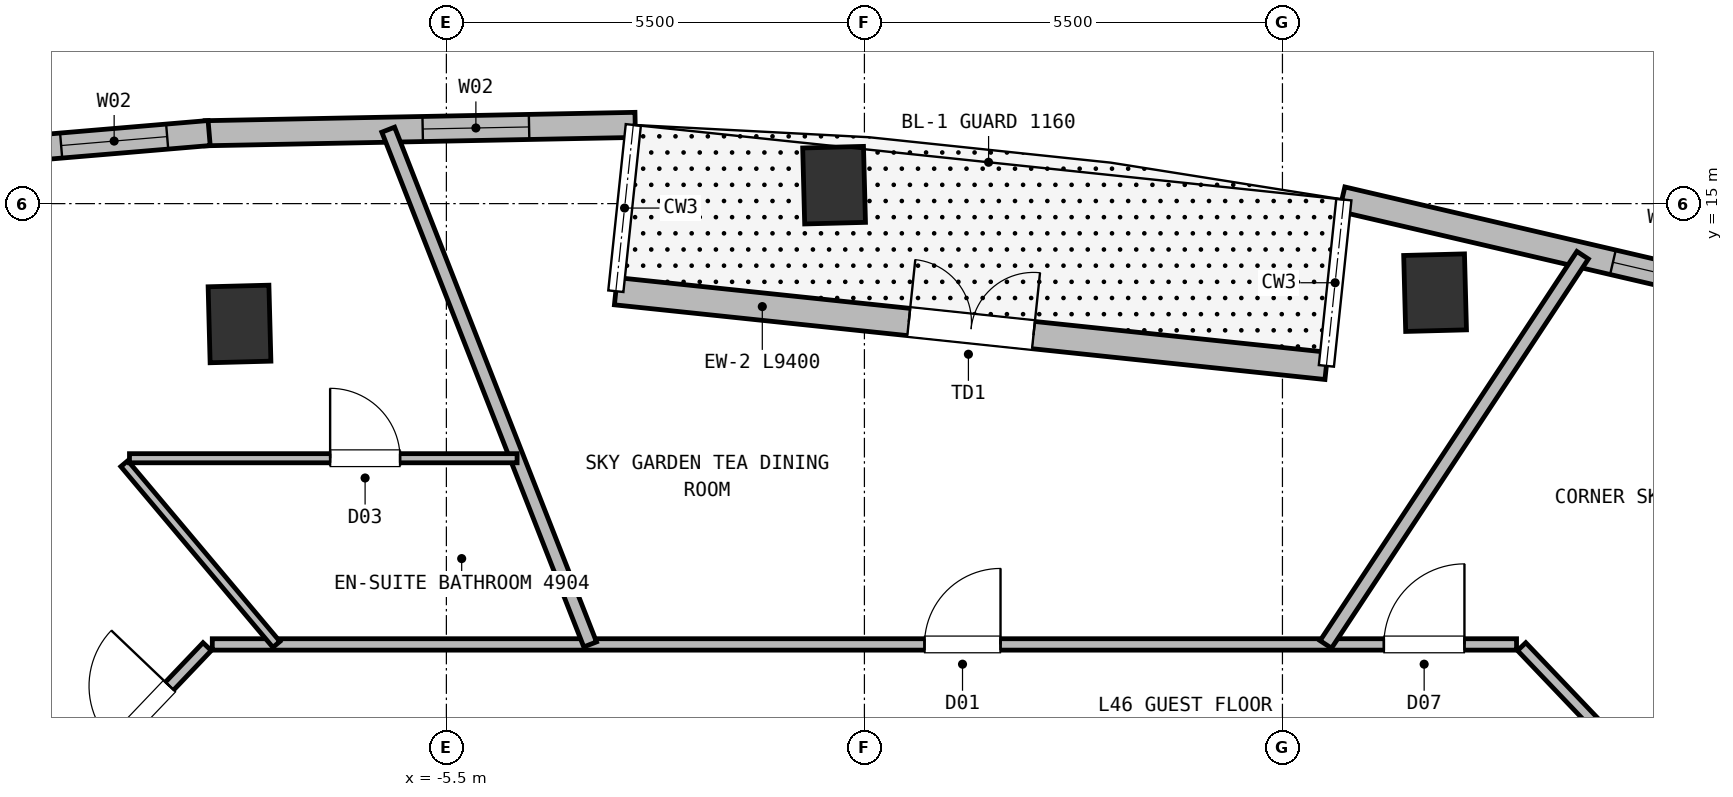
"""IFC4 building model, lengths in metres.
Left out: names, types, materials, properties, quantities, classifications, styles, units other than length and angle.
Written with IfcOpenShell. Run it as: python <this file> out.ifc"""

import sys

from ifc_helpers import new_model, si_unit, direction, frame, frame_2d, origin, origin_2d, place, context, subcontext, project, spatial, rectangle, extrude, element, fill, save


model = new_model("IFC4")
c1 = context("Model", 3, precision=1e-05, world=origin(), true_north=direction((0.0, 1.0)))
c2 = subcontext(c1, "Body", "Model", "MODEL_VIEW")
j1 = project(units=[si_unit("LENGTHUNIT", "METRE"), si_unit("PLANEANGLEUNIT", "RADIAN")], contexts=[c1])
p1 = place(None, origin())
s1 = spatial("IfcSite", under=j1, at=p1, CompositionType="ELEMENT")
p2 = place(p1, origin())
s2 = spatial("IfcBuilding", under=s1, at=p2, CompositionType="ELEMENT")
p3 = place(p2, frame((0.0, 0.0, 186.55)))
s3 = spatial("IfcBuildingStorey", under=s2, at=p3, CompositionType="ELEMENT", Elevation=186.55)
for number, where, z_axis, x_axis in (
    (1, (7.508, 13.828, 0.0), (0.0, 0.0, 1.0), (1.0, 0.026, 0.0)),
    (2, (-0.399, 15.243, 0.0), (0.0, 0.0, 1.0), (1.0, 0.026, 0.0)),
    (3, (-8.222, 13.417, 0.0), (0.0, 0.0, 1.0), (1.0, 0.026, 0.0)),
):
    element("IfcColumn", number, at=place(p3, frame(where, z_axis=z_axis, x_axis=x_axis)), inside=s3, PredefinedType="COLUMN", context=c2, shape_type="SweptSolid", body=[
        extrude(rectangle(XDim=0.8, YDim=1.0, at=origin_2d()), origin(), (0.0, 0.0, 1.0), 3.8),
    ])
p4 = place(p3, frame((-3.271, 13.848, 0.0), z_axis=(0.0, 0.0, 1.0), x_axis=(0.994520954065, -0.104537418785, 0.0)))
e4 = element("IfcWall", 4, at=p4, inside=s3, PredefinedType="SOLIDWALL", context=c2, shape_type="SweptSolid", body=[
    extrude(rectangle(XDim=9.4, YDim=0.36, at=frame_2d((4.7, 0.0))), origin(), (0.0, 0.0, 1.0), 3.55),
])
p5 = place(p4, frame((3.875, 0.0, 0.0)))
e5 = element("IfcOpeningElement", 5, at=p5, cuts=e4, PredefinedType="OPENING", context=c2, shape_type="SweptSolid", body=[
    extrude(rectangle(XDim=1.65, YDim=2.25, at=frame_2d((0.825, 1.125))), frame((0.0, 0.19, 0.0), z_axis=(0.0, -1.0, 0.0), x_axis=(1.0, 0.0, 0.0)), (0.0, 0.0, 1.0), 0.38),
])
p6 = place(p3, frame((6.284, 15.059, 0.0), z_axis=(0.0, 0.0, 1.0), x_axis=(0.973919150731, -0.226895323527, 0.0)))
e6 = element("IfcWall", 6, at=p6, inside=s3, PredefinedType="SOLIDWALL", context=c2, shape_type="SweptSolid", body=[
    extrude(rectangle(XDim=5.656, YDim=0.33, at=frame_2d((2.828, 0.0))), origin(), (0.0, 0.0, 1.0), 3.55),
])
p7 = place(p6, frame((3.66, 0.0, 0.72)))
e7 = element("IfcOpeningElement", 7, at=p7, cuts=e6, PredefinedType="OPENING", context=c2, shape_type="SweptSolid", body=[
    extrude(rectangle(XDim=1.4, YDim=1.88, at=frame_2d((0.7, 0.94))), frame((0.0, 0.175, 0.0), z_axis=(0.0, -1.0, 0.0), x_axis=(1.0, 0.0, 0.0)), (0.0, 0.0, 1.0), 0.35),
])
p8 = place(p3, frame((-8.671, 15.926, 0.0), z_axis=(0.0, 0.0, 1.0), x_axis=(0.999810548716, 0.019464497862, 0.0)))
e8 = element("IfcWall", 8, at=p8, inside=s3, PredefinedType="SOLIDWALL", context=c2, shape_type="SweptSolid", body=[
    extrude(rectangle(XDim=5.657, YDim=0.33, at=frame_2d((2.828, 0.0))), origin(), (0.0, 0.0, 1.0), 3.55),
])
p9 = place(p8, frame((2.86, 0.0, 0.72)))
e9 = element("IfcOpeningElement", 9, at=p9, cuts=e8, PredefinedType="OPENING", context=c2, shape_type="SweptSolid", body=[
    extrude(rectangle(XDim=1.4, YDim=1.88, at=frame_2d((0.7, 0.94))), frame((0.0, 0.175, 0.0), z_axis=(0.0, -1.0, 0.0), x_axis=(1.0, 0.0, 0.0)), (0.0, 0.0, 1.0), 0.35),
])
p10 = place(p3, frame((-11.121, 15.717, 0.0), z_axis=(0.0, 0.0, 1.0), x_axis=(0.996442999906, 0.084269495891, 0.0)))
e10 = element("IfcWall", 10, at=p10, inside=s3, PredefinedType="SOLIDWALL", context=c2, shape_type="SweptSolid", body=[
    extrude(rectangle(XDim=2.509, YDim=0.33, at=frame_2d((1.254, 0.0))), origin(), (0.0, 0.0, 1.0), 3.55),
])
p11 = place(p10, frame((0.554, 0.0, 0.72)))
e11 = element("IfcOpeningElement", 11, at=p11, cuts=e10, PredefinedType="OPENING", context=c2, shape_type="SweptSolid", body=[
    extrude(rectangle(XDim=1.4, YDim=1.84, at=frame_2d((0.7, 0.92))), frame((0.0, 0.175, 0.0), z_axis=(0.0, -1.0, 0.0), x_axis=(1.0, 0.0, 0.0)), (0.0, 0.0, 1.0), 0.35),
])
p12 = place(p3, frame((8.648, 9.171, 0.0), z_axis=(0.0, 0.0, 1.0), x_axis=(0.689960858356, -0.723846678473, 0.0)))
e12 = element("IfcWall", 12, at=p12, inside=s3, PredefinedType="PARTITIONING", context=c2, shape_type="SweptSolid", body=[
    extrude(rectangle(XDim=2.572, YDim=0.15, at=frame_2d((1.286, 0.0))), origin(), (0.0, 0.0, 1.0), 3.55),
])
p13 = place(p3, frame((-8.58, 9.2, 0.0), z_axis=(0.0, 0.0, 1.0), x_axis=(1.0, 0.0, 0.0)))
e13 = element("IfcWall", 13, at=p13, inside=s3, PredefinedType="PARTITIONING", context=c2, shape_type="SweptSolid", body=[
    extrude(rectangle(XDim=17.16, YDim=0.15, at=frame_2d((8.58, 0.0))), origin(), (0.0, 0.0, 1.0), 3.55),
])
p14 = place(p13, frame((9.371, 0.0, 0.0)))
e14 = element("IfcOpeningElement", 14, at=p14, cuts=e13, PredefinedType="OPENING", context=c2, shape_type="SweptSolid", body=[
    extrude(rectangle(XDim=1.0, YDim=2.15, at=frame_2d((0.5, 1.075))), frame((0.0, 0.085, 0.0), z_axis=(0.0, -1.0, 0.0), x_axis=(1.0, 0.0, 0.0)), (0.0, 0.0, 1.0), 0.17),
])
p15 = place(p13, frame((15.415, 0.0, 0.0)))
e15 = element("IfcOpeningElement", 15, at=p15, cuts=e13, PredefinedType="OPENING", context=c2, shape_type="SweptSolid", body=[
    extrude(rectangle(XDim=1.06, YDim=2.15, at=frame_2d((0.53, 1.075))), frame((0.0, 0.085, 0.0), z_axis=(0.0, -1.0, 0.0), x_axis=(1.0, 0.0, 0.0)), (0.0, 0.0, 1.0), 0.17),
])
p16 = place(p3, frame((-10.422, 7.309, 0.0), z_axis=(0.0, 0.0, 1.0), x_axis=(0.689960858356, 0.723846678473, 0.0)))
e16 = element("IfcWall", 16, at=p16, inside=s3, PredefinedType="PARTITIONING", context=c2, shape_type="SweptSolid", body=[
    extrude(rectangle(XDim=2.572, YDim=0.15, at=frame_2d((1.286, 0.0))), origin(), (0.0, 0.0, 1.0), 3.55),
])
p17 = place(p16, frame((0.796, 0.0, 0.0)))
e17 = element("IfcOpeningElement", 17, at=p17, cuts=e16, PredefinedType="OPENING", context=c2, shape_type="SweptSolid", body=[
    extrude(rectangle(XDim=1.06, YDim=2.15, at=frame_2d((0.53, 1.075))), frame((0.0, 0.085, 0.0), z_axis=(0.0, -1.0, 0.0), x_axis=(1.0, 0.0, 0.0)), (0.0, 0.0, 1.0), 0.17),
])
p18 = place(p3, frame((12.277, 8.914, 0.0), z_axis=(0.0, 0.0, 1.0), x_axis=(-0.809184297192, -0.587554910777, 0.0)))
e18 = element("IfcWall", 18, at=p18, inside=s3, PredefinedType="PARTITIONING", context=c2, shape_type="SweptSolid", body=[
    extrude(rectangle(XDim=2.472, YDim=0.12, at=frame_2d((1.236, 0.0))), origin(), (0.0, 0.0, 1.0), 3.55),
])
p19 = place(p3, frame((6.07, 9.2, 0.0), z_axis=(0.0, 0.0, 1.0), x_axis=(0.550708603457, 0.834697570428, 0.0)))
e19 = element("IfcWall", 19, at=p19, inside=s3, PredefinedType="PARTITIONING", context=c2, shape_type="SweptSolid", body=[
    extrude(rectangle(XDim=6.135, YDim=0.18, at=frame_2d((3.068, 0.0))), origin(), (0.0, 0.0, 1.0), 3.55),
])
p20 = place(p3, frame((-3.609, 9.2, 0.0), z_axis=(0.0, 0.0, 1.0), x_axis=(-0.365139424443, 0.930952845593, 0.0)))
e20 = element("IfcWall", 20, at=p20, inside=s3, PredefinedType="PARTITIONING", context=c2, shape_type="SweptSolid", body=[
    extrude(rectangle(XDim=7.275, YDim=0.18, at=frame_2d((3.638, 0.0))), origin(), (0.0, 0.0, 1.0), 3.55),
])
p21 = place(p3, frame((-7.736, 9.2, 0.0), z_axis=(0.0, 0.0, 1.0), x_axis=(-0.643615619496, 0.765348897131, 0.0)))
e21 = element("IfcWall", 21, at=p21, inside=s3, PredefinedType="PARTITIONING", context=c2, shape_type="SweptSolid", body=[
    extrude(rectangle(XDim=3.109, YDim=0.12, at=frame_2d((1.554, 0.0))), origin(), (0.0, 0.0, 1.0), 3.55),
])
p22 = place(p3, frame((-9.669, 11.65, 0.0), z_axis=(0.0, 0.0, 1.0), x_axis=(1.0, 0.0, 0.0)))
e22 = element("IfcWall", 22, at=p22, inside=s3, PredefinedType="PARTITIONING", context=c2, shape_type="SweptSolid", body=[
    extrude(rectangle(XDim=5.1, YDim=0.12, at=frame_2d((2.55, 0.0))), origin(), (0.0, 0.0, 1.0), 3.55),
])
p23 = place(p22, frame((2.64, 0.0, 0.0)))
e23 = element("IfcOpeningElement", 23, at=p23, cuts=e22, PredefinedType="OPENING", context=c2, shape_type="SweptSolid", body=[
    extrude(rectangle(XDim=0.92, YDim=2.1, at=frame_2d((0.46, 1.05))), frame((0.0, 0.07, 0.0), z_axis=(0.0, -1.0, 0.0), x_axis=(1.0, 0.0, 0.0)), (0.0, 0.0, 1.0), 0.14),
])
p24 = place(p3, frame((-10.45, 5.569, 0.0), z_axis=(0.0, 0.0, 1.0), x_axis=(-0.882520823544, 0.47027332054, 0.0)))
e24 = element("IfcWall", 24, at=p24, inside=s3, PredefinedType="PARTITIONING", context=c2, shape_type="SweptSolid", body=[
    extrude(rectangle(XDim=9.98, YDim=0.18, at=frame_2d((4.99, 0.0))), origin(), (0.0, 0.0, 1.0), 3.55),
])
p25 = place(p5, origin())
e25 = element("IfcDoor", 25, at=p25, inside=s3, OperationType="DOUBLE_DOOR_SINGLE_SWING", PredefinedType="DOOR", context=c2, shape_type="SweptSolid", body=[
    extrude(rectangle(XDim=1.65, YDim=2.25, at=frame_2d((0.825, 1.125))), frame((0.0, 0.025, 0.0), z_axis=(0.0, -1.0, 0.0), x_axis=(1.0, 0.0, 0.0)), (0.0, 0.0, 1.0), 0.05),
])
fill(e5, e25)
p26 = place(p7, origin())
e26 = element("IfcWindow", 26, at=p26, inside=s3, PartitioningType="SINGLE_PANEL", PredefinedType="WINDOW", context=c2, shape_type="SweptSolid", body=[
    extrude(rectangle(XDim=1.4, YDim=1.88, at=frame_2d((0.7, 0.94))), frame((0.0, 0.03, 0.0), z_axis=(0.0, -1.0, 0.0), x_axis=(1.0, 0.0, 0.0)), (0.0, 0.0, 1.0), 0.06),
])
fill(e7, e26)
p27 = place(p9, origin())
e27 = element("IfcWindow", 27, at=p27, inside=s3, PartitioningType="SINGLE_PANEL", PredefinedType="WINDOW", context=c2, shape_type="SweptSolid", body=[
    extrude(rectangle(XDim=1.4, YDim=1.88, at=frame_2d((0.7, 0.94))), frame((0.0, 0.03, 0.0), z_axis=(0.0, -1.0, 0.0), x_axis=(1.0, 0.0, 0.0)), (0.0, 0.0, 1.0), 0.06),
])
fill(e9, e27)
p28 = place(p11, origin())
e28 = element("IfcWindow", 28, at=p28, inside=s3, PartitioningType="SINGLE_PANEL", PredefinedType="WINDOW", context=c2, shape_type="SweptSolid", body=[
    extrude(rectangle(XDim=1.4, YDim=1.84, at=frame_2d((0.7, 0.92))), frame((0.0, 0.03, 0.0), z_axis=(0.0, -1.0, 0.0), x_axis=(1.0, 0.0, 0.0)), (0.0, 0.0, 1.0), 0.06),
])
fill(e11, e28)
p29 = place(p23, origin())
e29 = element("IfcDoor", 29, at=p29, inside=s3, OperationType="SINGLE_SWING_LEFT", PredefinedType="DOOR", context=c2, shape_type="SweptSolid", body=[
    extrude(rectangle(XDim=0.92, YDim=2.1, at=frame_2d((0.46, 1.05))), frame((0.0, 0.025, 0.0), z_axis=(0.0, -1.0, 0.0), x_axis=(1.0, 0.0, 0.0)), (0.0, 0.0, 1.0), 0.05),
])
fill(e23, e29)
p30 = place(p14, origin())
e30 = element("IfcDoor", 30, at=p30, inside=s3, OperationType="SINGLE_SWING_RIGHT", PredefinedType="DOOR", context=c2, shape_type="SweptSolid", body=[
    extrude(rectangle(XDim=1.0, YDim=2.15, at=frame_2d((0.5, 1.075))), frame((0.0, 0.025, 0.0), z_axis=(0.0, -1.0, 0.0), x_axis=(1.0, 0.0, 0.0)), (0.0, 0.0, 1.0), 0.05),
])
fill(e14, e30)
p31 = place(p15, origin())
e31 = element("IfcDoor", 31, at=p31, inside=s3, OperationType="SINGLE_SWING_RIGHT", PredefinedType="DOOR", context=c2, shape_type="SweptSolid", body=[
    extrude(rectangle(XDim=1.06, YDim=2.15, at=frame_2d((0.53, 1.075))), frame((0.0, 0.025, 0.0), z_axis=(0.0, -1.0, 0.0), x_axis=(1.0, 0.0, 0.0)), (0.0, 0.0, 1.0), 0.05),
])
fill(e15, e31)
p32 = place(p17, origin())
e32 = element("IfcDoor", 32, at=p32, inside=s3, OperationType="SINGLE_SWING_RIGHT", PredefinedType="DOOR", context=c2, shape_type="SweptSolid", body=[
    extrude(rectangle(XDim=1.06, YDim=2.15, at=frame_2d((0.53, 1.075))), frame((0.0, 0.025, 0.0), z_axis=(0.0, -1.0, 0.0), x_axis=(1.0, 0.0, 0.0)), (0.0, 0.0, 1.0), 0.05),
])
fill(e17, e32)
save(model, sys.argv[1])
